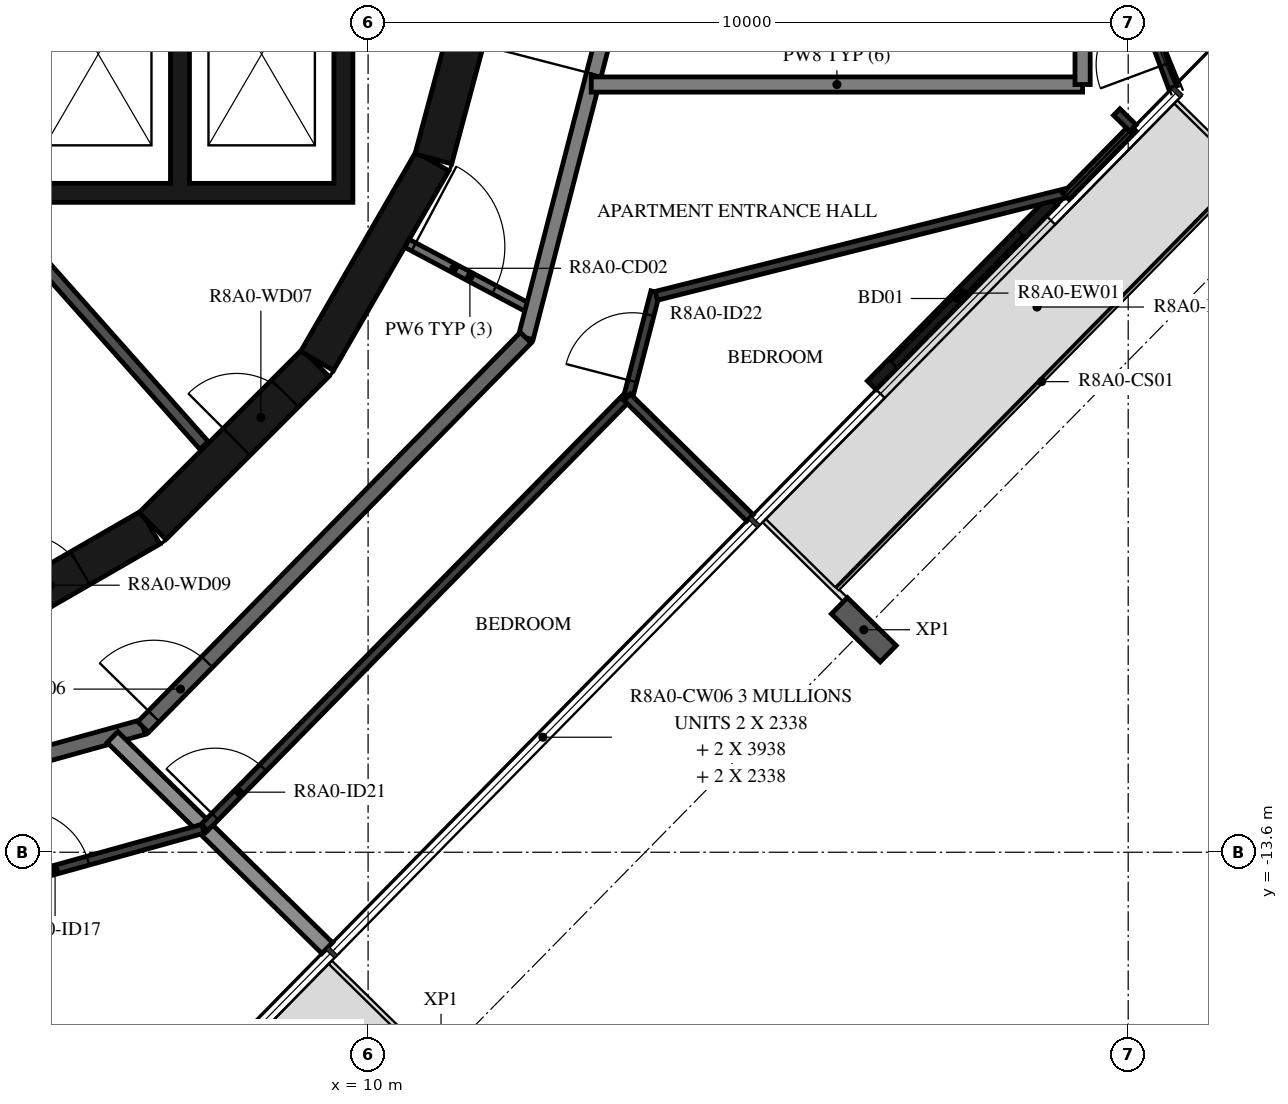
"""IFC4 building model, lengths in metres.
Left out: names, types, materials, properties, quantities, classifications, styles, units other than length and angle.
Written with IfcOpenShell. Run it as: python <this file> out.ifc"""

import sys

from ifc_helpers import new_model, si_unit, direction, frame, frame_2d, origin, origin_2d, place, context, subcontext, project, spatial, polyline, rectangle, i_section, outline, extrude, element, fill, save


model = new_model("IFC4")
c1 = context("Model", 3, precision=1e-05, world=origin(), true_north=direction((0.0, 1.0)))
c2 = subcontext(c1, "Body", "Model", "MODEL_VIEW")
j1 = project(units=[si_unit("LENGTHUNIT", "METRE"), si_unit("PLANEANGLEUNIT", "RADIAN")], contexts=[c1])
p1 = place(None, origin())
s1 = spatial("IfcSite", under=j1, at=p1, CompositionType="ELEMENT")
p2 = place(p1, origin())
s2 = spatial("IfcBuilding", under=s1, at=p2, CompositionType="ELEMENT")
p3 = place(p2, frame((0.0, 0.0, 305.2)))
s3 = spatial("IfcBuildingStorey", under=s2, at=p3, CompositionType="ELEMENT", Elevation=305.2)
p4 = place(p3, frame((16.521, -10.673, -0.38), z_axis=(0.0, 0.0, 1.0), x_axis=(-0.70090935439, -0.713250360623, 0.0)))
e1 = element("IfcColumn", 1, at=p4, inside=s3, PredefinedType="COLUMN", context=c2, shape_type="SweptSolid", body=[
    extrude(i_section(OverallWidth=0.3, OverallDepth=0.9, WebThickness=0.019, FlangeThickness=0.035, FilletRadius=0.03, at=origin_2d()), origin(), (0.0, 0.0, 1.0), 3.5),
])
p5 = place(p3, frame((16.626, -7.456, 0.0), z_axis=(0.0, 0.0, 1.0), x_axis=(0.700902547194, 0.713257049973, 0.0)))
e2 = element("IfcWall", 2, at=p5, inside=s3, PredefinedType="STANDARD", context=c2, shape_type="SweptSolid", body=[
    extrude(rectangle(XDim=3.399, YDim=0.16, at=frame_2d((1.699, 0.0))), origin(), (0.0, 0.0, 1.0), 3.12),
])
p6 = place(p5, frame((0.4, 0.0, 0.0)))
e3 = element("IfcOpeningElement", 3, at=p6, cuts=e2, PredefinedType="OPENING", context=c2, shape_type="SweptSolid", body=[
    extrude(rectangle(XDim=2.4, YDim=2.4, at=frame_2d((1.2, 1.2))), frame((0.0, 0.09, 0.0), z_axis=(0.0, -1.0, 0.0), x_axis=(1.0, 0.0, 0.0)), (0.0, 0.0, 1.0), 0.18),
])
p7 = place(p3, frame((4.51, -10.845, 0.0), z_axis=(0.0, 0.0, 1.0), x_axis=(0.865975092491, 0.500087131594, 0.0)))
e4 = element("IfcWall", 4, at=p7, inside=s3, PredefinedType="SHEAR", context=c2, shape_type="SweptSolid", body=[
    extrude(rectangle(XDim=3.033, YDim=0.5, at=frame_2d((1.516, 0.0))), origin(), (0.0, 0.0, 1.0), 3.12),
])
p8 = place(p7, frame((1.066, 0.0, 0.0)))
e5 = element("IfcOpeningElement", 5, at=p8, cuts=e4, PredefinedType="OPENING", context=c2, shape_type="SweptSolid", body=[
    extrude(rectangle(XDim=0.9, YDim=2.1, at=frame_2d((0.45, 1.05))), frame((0.0, 0.26, 0.0), z_axis=(0.0, -1.0, 0.0), x_axis=(1.0, 0.0, 0.0)), (0.0, 0.0, 1.0), 0.52),
])
p9 = place(p3, frame((7.164, -9.308, 0.0), z_axis=(0.0, 0.0, 1.0), x_axis=(0.707106781187, 0.707106781187, 0.0)))
e6 = element("IfcWall", 6, at=p9, inside=s3, PredefinedType="SHEAR", context=c2, shape_type="SweptSolid", body=[
    extrude(rectangle(XDim=3.032, YDim=0.5, at=frame_2d((1.516, 0.0))), origin(), (0.0, 0.0, 1.0), 3.12),
])
p10 = place(p9, frame((1.566, 0.0, 0.0)))
e7 = element("IfcOpeningElement", 7, at=p10, cuts=e6, PredefinedType="OPENING", context=c2, shape_type="SweptSolid", body=[
    extrude(rectangle(XDim=0.9, YDim=2.1, at=frame_2d((0.45, 1.05))), frame((0.0, 0.26, 0.0), z_axis=(0.0, -1.0, 0.0), x_axis=(1.0, 0.0, 0.0)), (0.0, 0.0, 1.0), 0.52),
])
for number, where, z_axis, x_axis in (
    (8, (9.329, -7.137, 0.0), (0.0, 0.0, 1.0), (0.5, 0.866, 0.0)),
    (9, (10.858, -4.479, 0.0), (0.0, 0.0, 1.0), (0.259, 0.966, 0.0)),
):
    element("IfcWall", number, at=place(p3, frame(where, z_axis=z_axis, x_axis=x_axis)), inside=s3, PredefinedType="SHEAR", context=c2, shape_type="SweptSolid", body=[
        extrude(rectangle(XDim=3.033, YDim=0.5, at=frame_2d((1.516, 0.0))), origin(), (0.0, 0.0, 1.0), 3.12),
    ])
p11 = place(p3, origin())
e10 = element("IfcWall", 10, at=p11, inside=s3, PredefinedType="SHEAR", context=c2, shape_type="SweptSolid", body=[
    extrude(outline(polyline([(9.8, -5.05), (9.8, -4.8), (9.8, -1.9), (9.55, -1.9), (9.55, -4.8), (7.65, -4.8), (7.65, -1.9), (7.4, -1.9), (7.4, -4.8), (5.5, -4.8), (5.5, -1.9), (5.25, -1.9), (5.25, -4.8), (3.35, -4.8), (3.35, -1.9), (3.1, -1.9), (3.1, -4.8), (1.2, -4.8), (1.2, -1.9), (0.95, -1.9), (0.95, -4.8), (-0.95, -4.8), (-0.95, -1.9), (-1.2, -1.9), (-1.2, -4.8), (-3.1, -4.8), (-3.1, -1.9), (-3.35, -1.9), (-3.35, -4.8), (-5.25, -4.8), (-5.25, -1.9), (-5.5, -1.9), (-5.5, -4.8), (-9.55, -4.8), (-9.55, -1.9), (-9.8, -1.9), (-9.8, -4.8), (-9.8, -5.05), (9.8, -5.05)])), origin(), (0.0, 0.0, 1.0), 3.12),
])
p12 = place(p3, frame((7.842, -8.248, 0.0), z_axis=(0.0, 0.0, 1.0), x_axis=(-0.66446128181, 0.747322691329, 0.0)))
e11 = element("IfcWall", 11, at=p12, inside=s3, PredefinedType="PARTITIONING", context=c2, shape_type="SweptSolid", body=[
    extrude(rectangle(XDim=4.198, YDim=0.15, at=frame_2d((2.099, 0.0))), origin(), (0.0, 0.0, 1.0), 3.12),
])
p13 = place(p3, frame((10.511, -5.589, 0.0), z_axis=(0.0, 0.0, 1.0), x_axis=(0.882957311919, -0.469453283437, 0.0)))
e12 = element("IfcWall", 12, at=p13, inside=s3, PredefinedType="PARTITIONING", context=c2, shape_type="SweptSolid", body=[
    extrude(rectangle(XDim=1.876, YDim=0.12, at=frame_2d((0.938, 0.0))), origin(), (0.0, 0.0, 1.0), 3.12),
])
p14 = place(p13, frame((0.1, 0.0, 0.0)))
e13 = element("IfcOpeningElement", 13, at=p14, cuts=e12, PredefinedType="OPENING", context=c2, shape_type="SweptSolid", body=[
    extrude(rectangle(XDim=1.2, YDim=2.1, at=frame_2d((0.6, 1.05))), frame((0.0, 0.07, 0.0), z_axis=(0.0, -1.0, 0.0), x_axis=(1.0, 0.0, 0.0)), (0.0, 0.0, 1.0), 0.14),
])
p15 = place(p3, frame((12.074, -6.831, 0.0), z_axis=(0.0, 0.0, 1.0), x_axis=(0.250391063186, 0.968144780225, 0.0)))
e14 = element("IfcWall", 14, at=p15, inside=s3, PredefinedType="STANDARD", context=c2, shape_type="SweptSolid", body=[
    extrude(rectangle(XDim=7.181, YDim=0.2, at=frame_2d((3.591, 0.0))), origin(), (0.0, 0.0, 1.0), 3.12),
])
p16 = place(p15, frame((3.581, 0.0, 0.0)))
e15 = element("IfcOpeningElement", 15, at=p16, cuts=e14, PredefinedType="OPENING", context=c2, shape_type="SweptSolid", body=[
    extrude(rectangle(XDim=1.8, YDim=2.1, at=frame_2d((0.9, 1.05))), frame((0.0, 0.11, 0.0), z_axis=(0.0, -1.0, 0.0), x_axis=(1.0, 0.0, 0.0)), (0.0, 0.0, 1.0), 0.22),
])
p17 = place(p3, frame((0.121, -13.872, 0.0), z_axis=(0.0, 0.0, 1.0), x_axis=(0.963625960674, 0.267254575108, 0.0)))
e16 = element("IfcWall", 16, at=p17, inside=s3, PredefinedType="STANDARD", context=c2, shape_type="SweptSolid", body=[
    extrude(rectangle(XDim=7.181, YDim=0.2, at=frame_2d((3.591, 0.0))), origin(), (0.0, 0.0, 1.0), 3.12),
])
p18 = place(p3, frame((7.041, -11.953, 0.0), z_axis=(0.0, 0.0, 1.0), x_axis=(0.70090916255, 0.713250549143, 0.0)))
e17 = element("IfcWall", 17, at=p18, inside=s3, PredefinedType="STANDARD", context=c2, shape_type="SweptSolid", body=[
    extrude(rectangle(XDim=7.181, YDim=0.2, at=frame_2d((3.59, 0.0))), origin(), (0.0, 0.0, 1.0), 3.12),
])
p19 = place(p18, frame((0.2, 0.0, 0.0)))
e18 = element("IfcOpeningElement", 18, at=p19, cuts=e17, PredefinedType="OPENING", context=c2, shape_type="SweptSolid", body=[
    extrude(rectangle(XDim=1.0, YDim=2.1, at=frame_2d((0.5, 1.05))), frame((0.0, 0.11, 0.0), z_axis=(0.0, -1.0, 0.0), x_axis=(1.0, 0.0, 0.0)), (0.0, 0.0, 1.0), 0.22),
])
p20 = place(p3, frame((12.936, -3.5, 0.0), z_axis=(0.0, 0.0, 1.0), x_axis=(1.0, 0.0, 0.0)))
e19 = element("IfcWall", 19, at=p20, inside=s3, PredefinedType="STANDARD", context=c2, shape_type="SweptSolid", body=[
    extrude(rectangle(XDim=6.464, YDim=0.2, at=frame_2d((3.232, 0.0))), origin(), (0.0, 0.0, 1.0), 3.12),
])
p21 = place(p3, frame((19.4, -3.5, 0.0), z_axis=(0.0, 0.0, 1.0), x_axis=(0.0, 1.0, 0.0)))
e20 = element("IfcWall", 20, at=p21, inside=s3, PredefinedType="STANDARD", context=c2, shape_type="SweptSolid", body=[
    extrude(rectangle(XDim=3.889, YDim=0.2, at=frame_2d((1.944, 0.0))), origin(), (0.0, 0.0, 1.0), 3.12),
])
p22 = place(p3, frame((9.462, -14.861, 0.0), z_axis=(0.0, 0.0, 1.0), x_axis=(-0.713276937124, 0.700882308927, 0.0)))
e21 = element("IfcWall", 21, at=p22, inside=s3, PredefinedType="STANDARD", context=c2, shape_type="SweptSolid", body=[
    extrude(rectangle(XDim=3.959, YDim=0.2, at=frame_2d((1.979, 0.0))), origin(), (0.0, 0.0, 1.0), 2.73),
])
p23 = place(p3, frame((0.21, -15.404, 0.0), z_axis=(0.0, 0.0, 1.0), x_axis=(0.963630625717, 0.267237754032, 0.0)))
e22 = element("IfcWall", 22, at=p23, inside=s3, PredefinedType="PARTITIONING", context=c2, shape_type="SweptSolid", body=[
    extrude(rectangle(XDim=7.907, YDim=0.12, at=frame_2d((3.954, 0.0))), origin(), (0.0, 0.0, 1.0), 3.12),
])
p24 = place(p23, frame((0.4, 0.0, 0.0)))
e23 = element("IfcOpeningElement", 23, at=p24, cuts=e22, PredefinedType="OPENING", context=c2, shape_type="SweptSolid", body=[
    extrude(rectangle(XDim=0.8, YDim=2.1, at=frame_2d((0.4, 1.05))), frame((0.0, 0.07, 0.0), z_axis=(0.0, -1.0, 0.0), x_axis=(1.0, 0.0, 0.0)), (0.0, 0.0, 1.0), 0.14),
])
p25 = place(p23, frame((5.436, 0.0, 0.0)))
e24 = element("IfcOpeningElement", 24, at=p25, cuts=e22, PredefinedType="OPENING", context=c2, shape_type="SweptSolid", body=[
    extrude(rectangle(XDim=0.9, YDim=2.1, at=frame_2d((0.45, 1.05))), frame((0.0, 0.07, 0.0), z_axis=(0.0, -1.0, 0.0), x_axis=(1.0, 0.0, 0.0)), (0.0, 0.0, 1.0), 0.14),
])
p26 = place(p3, frame((7.846, -13.273, 0.0), z_axis=(0.0, 0.0, 1.0), x_axis=(0.700911018066, 0.713248725728, 0.0)))
e25 = element("IfcWall", 25, at=p26, inside=s3, PredefinedType="PARTITIONING", context=c2, shape_type="SweptSolid", body=[
    extrude(rectangle(XDim=7.935, YDim=0.12, at=frame_2d((3.968, 0.0))), origin(), (0.0, 0.0, 1.0), 3.12),
])
p27 = place(p26, frame((0.2, 0.0, 0.0)))
e26 = element("IfcOpeningElement", 26, at=p27, cuts=e25, PredefinedType="OPENING", context=c2, shape_type="SweptSolid", body=[
    extrude(rectangle(XDim=0.9, YDim=2.1, at=frame_2d((0.45, 1.05))), frame((0.0, 0.07, 0.0), z_axis=(0.0, -1.0, 0.0), x_axis=(1.0, 0.0, 0.0)), (0.0, 0.0, 1.0), 0.14),
])
p28 = place(p3, frame((13.426, -7.596, 0.0), z_axis=(0.0, 0.0, 1.0), x_axis=(0.250380027586, 0.968147634292, 0.0)))
e27 = element("IfcWall", 27, at=p28, inside=s3, PredefinedType="PARTITIONING", context=c2, shape_type="SweptSolid", body=[
    extrude(rectangle(XDim=1.412, YDim=0.12, at=frame_2d((0.706, 0.0))), origin(), (0.0, 0.0, 1.0), 3.12),
])
p29 = place(p28, frame((0.2, 0.0, 0.0)))
e28 = element("IfcOpeningElement", 28, at=p29, cuts=e27, PredefinedType="OPENING", context=c2, shape_type="SweptSolid", body=[
    extrude(rectangle(XDim=0.9, YDim=2.1, at=frame_2d((0.45, 1.05))), frame((0.0, 0.07, 0.0), z_axis=(0.0, -1.0, 0.0), x_axis=(1.0, 0.0, 0.0)), (0.0, 0.0, 1.0), 0.14),
])
p30 = place(p3, frame((13.792, -6.28, 0.0), z_axis=(0.0, 0.0, 1.0), x_axis=(0.970009253073, 0.243067992449, 0.0)))
e29 = element("IfcWall", 29, at=p30, inside=s3, PredefinedType="PARTITIONING", context=c2, shape_type="SweptSolid", body=[
    extrude(rectangle(XDim=5.611, YDim=0.12, at=frame_2d((2.805, 0.0))), origin(), (0.0, 0.0, 1.0), 3.12),
])
p31 = place(p3, frame((19.18, -4.971, 0.0), z_axis=(0.0, 0.0, 1.0), x_axis=(0.700974030867, 0.713186797445, 0.0)))
e30 = element("IfcWall", 30, at=p31, inside=s3, PredefinedType="PARTITIONING", context=c2, shape_type="SweptSolid", body=[
    extrude(rectangle(XDim=1.26, YDim=0.12, at=frame_2d((0.63, 0.0))), origin(), (0.0, 0.0, 1.0), 3.12),
])
p32 = place(p3, frame((20.59, -3.537, 0.0), z_axis=(0.0, 0.0, 1.0), x_axis=(-0.348621180513, 0.937263715556, 0.0)))
e31 = element("IfcWall", 31, at=p32, inside=s3, PredefinedType="PARTITIONING", context=c2, shape_type="SweptSolid", body=[
    extrude(rectangle(XDim=3.413, YDim=0.12, at=frame_2d((1.706, 0.0))), origin(), (0.0, 0.0, 1.0), 3.12),
])
p33 = place(p32, frame((0.32, 0.0, 0.0)))
e32 = element("IfcOpeningElement", 32, at=p33, cuts=e31, PredefinedType="OPENING", context=c2, shape_type="SweptSolid", body=[
    extrude(rectangle(XDim=0.9, YDim=2.1, at=frame_2d((0.45, 1.05))), frame((0.0, 0.07, 0.0), z_axis=(0.0, -1.0, 0.0), x_axis=(1.0, 0.0, 0.0)), (0.0, 0.0, 1.0), 0.14),
])
p34 = place(p3, frame((15.024, -9.201, 0.0), z_axis=(0.0, 0.0, 1.0), x_axis=(-0.713331704042, 0.700826569137, 0.0)))
e33 = element("IfcWall", 33, at=p34, inside=s3, PredefinedType="PARTITIONING", context=c2, shape_type="SweptSolid", body=[
    extrude(rectangle(XDim=2.265, YDim=0.12, at=frame_2d((1.132, 0.0))), origin(), (0.0, 0.0, 1.0), 2.73),
])
p35 = place(p3, frame((20.063, -4.073, 0.0), z_axis=(0.0, 0.0, 1.0), x_axis=(-0.7135861572, 0.700567481584, 0.0)))
e34 = element("IfcWall", 34, at=p35, inside=s3, PredefinedType="PARTITIONING", context=c2, shape_type="SweptSolid", body=[
    extrude(rectangle(XDim=0.3, YDim=0.12, at=frame_2d((0.15, 0.0))), origin(), (0.0, 0.0, 1.0), 3.12),
])
p36 = place(p6, origin())
e35 = element("IfcDoor", 35, at=p36, inside=s3, OperationType="DOUBLE_DOOR_SLIDING", PredefinedType="DOOR", context=c2, shape_type="SweptSolid", body=[
    extrude(rectangle(XDim=2.4, YDim=2.4, at=frame_2d((1.2, 1.2))), frame((0.0, 0.025, 0.0), z_axis=(0.0, -1.0, 0.0), x_axis=(1.0, 0.0, 0.0)), (0.0, 0.0, 1.0), 0.05),
])
fill(e3, e35)
p37 = place(p10, origin())
e36 = element("IfcDoor", 36, at=p37, inside=s3, OperationType="SINGLE_SWING_LEFT", PredefinedType="DOOR", context=c2, shape_type="SweptSolid", body=[
    extrude(rectangle(XDim=0.9, YDim=2.1, at=frame_2d((0.45, 1.05))), frame((0.0, 0.025, 0.0), z_axis=(0.0, -1.0, 0.0), x_axis=(1.0, 0.0, 0.0)), (0.0, 0.0, 1.0), 0.05),
])
fill(e7, e36)
p38 = place(p8, origin())
e37 = element("IfcDoor", 37, at=p38, inside=s3, OperationType="SINGLE_SWING_LEFT", PredefinedType="DOOR", context=c2, shape_type="SweptSolid", body=[
    extrude(rectangle(XDim=0.9, YDim=2.1, at=frame_2d((0.45, 1.05))), frame((0.0, 0.025, 0.0), z_axis=(0.0, -1.0, 0.0), x_axis=(1.0, 0.0, 0.0)), (0.0, 0.0, 1.0), 0.05),
])
fill(e5, e37)
p39 = place(p25, origin())
e38 = element("IfcDoor", 38, at=p39, inside=s3, OperationType="SINGLE_SWING_LEFT", PredefinedType="DOOR", context=c2, shape_type="SweptSolid", body=[
    extrude(rectangle(XDim=0.9, YDim=2.1, at=frame_2d((0.45, 1.05))), frame((0.0, 0.025, 0.0), z_axis=(0.0, -1.0, 0.0), x_axis=(1.0, 0.0, 0.0)), (0.0, 0.0, 1.0), 0.05),
])
fill(e24, e38)
p40 = place(p19, origin())
e39 = element("IfcDoor", 39, at=p40, inside=s3, OperationType="SINGLE_SWING_LEFT", PredefinedType="DOOR", context=c2, shape_type="SweptSolid", body=[
    extrude(rectangle(XDim=1.0, YDim=2.1, at=frame_2d((0.5, 1.05))), frame((0.0, 0.025, 0.0), z_axis=(0.0, -1.0, 0.0), x_axis=(1.0, 0.0, 0.0)), (0.0, 0.0, 1.0), 0.05),
])
fill(e18, e39)
p41 = place(p27, origin())
e40 = element("IfcDoor", 40, at=p41, inside=s3, OperationType="SINGLE_SWING_LEFT", PredefinedType="DOOR", context=c2, shape_type="SweptSolid", body=[
    extrude(rectangle(XDim=0.9, YDim=2.1, at=frame_2d((0.45, 1.05))), frame((0.0, 0.025, 0.0), z_axis=(0.0, -1.0, 0.0), x_axis=(1.0, 0.0, 0.0)), (0.0, 0.0, 1.0), 0.05),
])
fill(e26, e40)
p42 = place(p29, origin())
e41 = element("IfcDoor", 41, at=p42, inside=s3, OperationType="SINGLE_SWING_RIGHT", PredefinedType="DOOR", context=c2, shape_type="SweptSolid", body=[
    extrude(rectangle(XDim=0.9, YDim=2.1, at=frame_2d((0.45, 1.05))), frame((0.0, 0.025, 0.0), z_axis=(0.0, -1.0, 0.0), x_axis=(1.0, 0.0, 0.0)), (0.0, 0.0, 1.0), 0.05),
])
fill(e28, e41)
p43 = place(p33, origin())
e42 = element("IfcDoor", 42, at=p43, inside=s3, OperationType="SINGLE_SWING_RIGHT", PredefinedType="DOOR", context=c2, shape_type="SweptSolid", body=[
    extrude(rectangle(XDim=0.9, YDim=2.1, at=frame_2d((0.45, 1.05))), frame((0.0, 0.025, 0.0), z_axis=(0.0, -1.0, 0.0), x_axis=(1.0, 0.0, 0.0)), (0.0, 0.0, 1.0), 0.05),
])
fill(e32, e42)
p44 = place(p14, origin())
e43 = element("IfcDoor", 43, at=p44, inside=s3, OperationType="DOUBLE_DOOR_SINGLE_SWING", PredefinedType="DOOR", context=c2, shape_type="SweptSolid", body=[
    extrude(rectangle(XDim=1.2, YDim=2.1, at=frame_2d((0.6, 1.05))), frame((0.0, 0.025, 0.0), z_axis=(0.0, -1.0, 0.0), x_axis=(1.0, 0.0, 0.0)), (0.0, 0.0, 1.0), 0.05),
])
fill(e13, e43)
p45 = place(p16, origin())
e44 = element("IfcDoor", 44, at=p45, inside=s3, OperationType="DOUBLE_DOOR_SINGLE_SWING", PredefinedType="DOOR", context=c2, shape_type="SweptSolid", body=[
    extrude(rectangle(XDim=1.8, YDim=2.1, at=frame_2d((0.9, 1.05))), frame((0.0, 0.025, 0.0), z_axis=(0.0, -1.0, 0.0), x_axis=(1.0, 0.0, 0.0)), (0.0, 0.0, 1.0), 0.05),
])
fill(e15, e44)
save(model, sys.argv[1])
